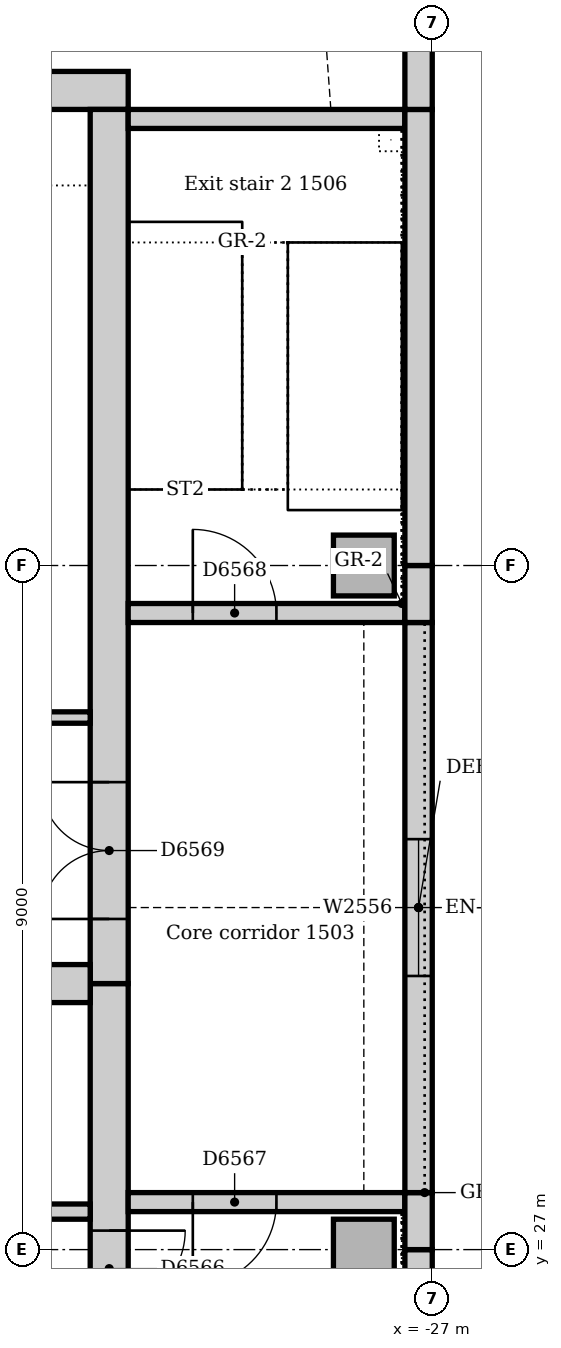
"""IFC4 building model, lengths in metres.
Left out: names, types, materials, properties, quantities, classifications, styles, units other than length and angle.
Written with IfcOpenShell. Run it as: python <this file> out.ifc"""

import sys

from ifc_helpers import new_model, si_unit, direction, frame, frame_2d, origin, origin_2d, place, context, subcontext, project, spatial, rectangle, extrude, element, fill, save


model = new_model("IFC4")
c1 = context("Model", 3, precision=1e-05, world=origin(), true_north=direction((0.0, 1.0)))
c2 = subcontext(c1, "Body", "Model", "MODEL_VIEW")
j1 = project(units=[si_unit("LENGTHUNIT", "METRE"), si_unit("PLANEANGLEUNIT", "RADIAN")], contexts=[c1])
p1 = place(None, origin())
s1 = spatial("IfcSite", under=j1, at=p1, CompositionType="ELEMENT")
p2 = place(p1, origin())
s2 = spatial("IfcBuilding", under=s1, at=p2, CompositionType="ELEMENT")
p3 = place(p2, frame((0.0, 0.0, 67.0)))
s3 = spatial("IfcBuildingStorey", under=s2, at=p3, CompositionType="ELEMENT", Elevation=67.0)
p4 = place(p3, frame((-31.0, 42.25, 0.0), z_axis=(0.0, 0.0, 1.0), x_axis=(-1.0, 0.0, 0.0)))
e1 = element("IfcWall", 1, at=p4, inside=s3, PredefinedType="SOLIDWALL", context=c2, shape_type="SweptSolid", body=[
    extrude(rectangle(XDim=11.5, YDim=0.5, at=frame_2d((5.75, 0.0))), origin(), (0.0, 0.0, 1.0), 4.0),
])
p5 = place(p3, frame((-31.25, 21.0, 0.0), z_axis=(0.0, 0.0, 1.0), x_axis=(0.0, 1.0, 0.0)))
e2 = element("IfcWall", 2, at=p5, inside=s3, PredefinedType="SOLIDWALL", context=c2, shape_type="SweptSolid", body=[
    extrude(rectangle(XDim=9.5, YDim=0.5, at=frame_2d((4.75, 0.0))), origin(), (0.0, 0.0, 1.0), 4.0),
])
p6 = place(p5, frame((5.25, 0.0, 0.0)))
e3 = element("IfcOpeningElement", 3, at=p6, cuts=e2, PredefinedType="OPENING", context=c2, shape_type="SweptSolid", body=[
    extrude(rectangle(XDim=1.0, YDim=2.1, at=frame_2d((0.5, 1.05))), frame((0.0, 0.26, 0.0), z_axis=(0.0, -1.0, 0.0), x_axis=(1.0, 0.0, 0.0)), (0.0, 0.0, 1.0), 0.52),
])
p7 = place(p3, frame((-31.25, 30.5, 0.0), z_axis=(0.0, 0.0, 1.0), x_axis=(0.0, 1.0, 0.0)))
e4 = element("IfcWall", 4, at=p7, inside=s3, PredefinedType="SOLIDWALL", context=c2, shape_type="SweptSolid", body=[
    extrude(rectangle(XDim=11.5, YDim=0.5, at=frame_2d((5.75, 0.0))), origin(), (0.0, 0.0, 1.0), 4.0),
])
p8 = place(p7, frame((0.85, 0.0, 0.0)))
e5 = element("IfcOpeningElement", 5, at=p8, cuts=e4, PredefinedType="OPENING", context=c2, shape_type="SweptSolid", body=[
    extrude(rectangle(XDim=1.8, YDim=2.1, at=frame_2d((0.9, 1.05))), frame((0.0, 0.26, 0.0), z_axis=(0.0, -1.0, 0.0), x_axis=(1.0, 0.0, 0.0)), (0.0, 0.0, 1.0), 0.52),
])
p9 = place(p3, frame((-42.0, 30.5, 0.0), z_axis=(0.0, 0.0, 1.0), x_axis=(1.0, 0.0, 0.0)))
e6 = element("IfcWall", 6, at=p9, inside=s3, PredefinedType="SOLIDWALL", context=c2, shape_type="SweptSolid", body=[
    extrude(rectangle(XDim=10.5, YDim=0.5, at=frame_2d((5.25, 0.0))), origin(), (0.0, 0.0, 1.0), 4.0),
])
p10 = place(p3, frame((-27.36, 27.625, 0.0), z_axis=(0.0, 0.0, 1.0), x_axis=(-1.0, 0.0, 0.0)))
e7 = element("IfcWall", 7, at=p10, inside=s3, PredefinedType="SOLIDWALL", context=c2, shape_type="SweptSolid", body=[
    extrude(rectangle(XDim=3.64, YDim=0.25, at=frame_2d((1.82, 0.0))), origin(), (0.0, 0.0, 1.0), 4.0),
])
p11 = place(p10, frame((1.69, 0.0, 0.0)))
e8 = element("IfcOpeningElement", 8, at=p11, cuts=e7, PredefinedType="OPENING", context=c2, shape_type="SweptSolid", body=[
    extrude(rectangle(XDim=1.1, YDim=2.1, at=frame_2d((0.55, 1.05))), frame((0.0, 0.135, 0.0), z_axis=(0.0, -1.0, 0.0), x_axis=(1.0, 0.0, 0.0)), (0.0, 0.0, 1.0), 0.27),
])
p12 = place(p3, frame((-31.0, 35.375, 0.0), z_axis=(0.0, 0.0, 1.0), x_axis=(1.0, 0.0, 0.0)))
e9 = element("IfcWall", 9, at=p12, inside=s3, PredefinedType="SOLIDWALL", context=c2, shape_type="SweptSolid", body=[
    extrude(rectangle(XDim=3.64, YDim=0.25, at=frame_2d((1.82, 0.0))), origin(), (0.0, 0.0, 1.0), 4.0),
])
p13 = place(p12, frame((0.85, 0.0, 0.0)))
e10 = element("IfcOpeningElement", 10, at=p13, cuts=e9, PredefinedType="OPENING", context=c2, shape_type="SweptSolid", body=[
    extrude(rectangle(XDim=1.1, YDim=2.1, at=frame_2d((0.55, 1.05))), frame((0.0, 0.135, 0.0), z_axis=(0.0, -1.0, 0.0), x_axis=(1.0, 0.0, 0.0)), (0.0, 0.0, 1.0), 0.27),
])
p14 = place(p3, frame((-27.36, 41.875, 0.0), z_axis=(0.0, 0.0, 1.0), x_axis=(-1.0, 0.0, 0.0)))
e11 = element("IfcWall", 11, at=p14, inside=s3, PredefinedType="SOLIDWALL", context=c2, shape_type="SweptSolid", body=[
    extrude(rectangle(XDim=3.64, YDim=0.25, at=frame_2d((1.82, 0.0))), origin(), (0.0, 0.0, 1.0), 4.0),
])
for number, where, z_axis, x_axis in (
    (12, (-27.9, 27.0, 0.0), (0.0, 0.0, 1.0), (1.0, 0.0, 0.0)),
    (13, (-27.9, 36.0, 0.0), (0.0, 0.0, 1.0), (1.0, 0.0, 0.0)),
):
    element("IfcColumn", number, at=place(p3, frame(where, z_axis=z_axis, x_axis=x_axis)), inside=s3, PredefinedType="COLUMN", context=c2, shape_type="SweptSolid", body=[
        extrude(rectangle(XDim=0.8, YDim=0.8, at=origin_2d()), origin(), (0.0, 0.0, 1.0), 4.0),
    ])
p15 = place(p3, frame((-27.18, 21.0, 0.0), z_axis=(0.0, 0.0, 1.0), x_axis=(0.0, 1.0, 0.0)))
e14 = element("IfcWall", 14, at=p15, inside=s3, PredefinedType="STANDARD", context=c2, shape_type="SweptSolid", body=[
    extrude(rectangle(XDim=6.0, YDim=0.36, at=frame_2d((3.0, 0.0))), origin(), (0.0, 0.0, 1.0), 3.85),
])
p16 = place(p3, frame((-27.18, 27.0, 0.0), z_axis=(0.0, 0.0, 1.0), x_axis=(0.0, 1.0, 0.0)))
e15 = element("IfcWall", 15, at=p16, inside=s3, PredefinedType="STANDARD", context=c2, shape_type="SweptSolid", body=[
    extrude(rectangle(XDim=0.75, YDim=0.36, at=frame_2d((0.375, 0.0))), origin(), (0.0, 0.0, 1.0), 3.436),
])
p17 = place(p3, frame((-27.18, 27.75, 0.0), z_axis=(0.0, 0.0, 1.0), x_axis=(0.0, 1.0, 0.0)))
e16 = element("IfcWall", 16, at=p17, inside=s3, PredefinedType="STANDARD", context=c2, shape_type="SweptSolid", body=[
    extrude(rectangle(XDim=7.5, YDim=0.36, at=frame_2d((3.75, 0.0))), origin(), (0.0, 0.0, 1.0), 3.436),
])
p18 = place(p17, frame((2.85, 0.0, 1.2)))
e17 = element("IfcOpeningElement", 17, at=p18, cuts=e16, PredefinedType="OPENING", context=c2, shape_type="SweptSolid", body=[
    extrude(rectangle(XDim=1.8, YDim=1.2, at=frame_2d((0.9, 0.6))), frame((0.0, 0.19, 0.0), z_axis=(0.0, -1.0, 0.0), x_axis=(1.0, 0.0, 0.0)), (0.0, 0.0, 1.0), 0.38),
])
p19 = place(p3, frame((-27.18, 35.25, 0.0), z_axis=(0.0, 0.0, 1.0), x_axis=(0.0, 1.0, 0.0)))
e18 = element("IfcWall", 18, at=p19, inside=s3, PredefinedType="STANDARD", context=c2, shape_type="SweptSolid", body=[
    extrude(rectangle(XDim=0.75, YDim=0.36, at=frame_2d((0.375, 0.0))), origin(), (0.0, 0.0, 1.0), 3.436),
])
p20 = place(p3, frame((-27.18, 36.0, 0.0), z_axis=(0.0, 0.0, 1.0), x_axis=(0.0, 1.0, 0.0)))
e19 = element("IfcWall", 19, at=p20, inside=s3, PredefinedType="STANDARD", context=c2, shape_type="SweptSolid", body=[
    extrude(rectangle(XDim=6.0, YDim=0.36, at=frame_2d((3.0, 0.0))), origin(), (0.0, 0.0, 1.0), 3.85),
])
p21 = place(p3, frame((-27.18, 42.0, 0.0), z_axis=(0.0, 0.0, 1.0), x_axis=(0.0, 1.0, 0.0)))
e20 = element("IfcWall", 20, at=p21, inside=s3, PredefinedType="STANDARD", context=c2, shape_type="SweptSolid", body=[
    extrude(rectangle(XDim=1.007, YDim=0.36, at=frame_2d((0.504, 0.0))), origin(), (0.0, 0.0, 1.0), 3.85),
])
p22 = place(p3, frame((-34.9, 27.5, 0.0), z_axis=(0.0, 0.0, 1.0), x_axis=(1.0, 0.0, 0.0)))
e21 = element("IfcWall", 21, at=p22, inside=s3, PredefinedType="SOLIDWALL", context=c2, shape_type="SweptSolid", body=[
    extrude(rectangle(XDim=3.4, YDim=0.2, at=frame_2d((1.7, 0.0))), origin(), (0.0, 0.0, 1.0), 4.0),
])
p23 = place(p22, frame((1.1, 0.0, 0.0)))
e22 = element("IfcOpeningElement", 22, at=p23, cuts=e21, PredefinedType="OPENING", context=c2, shape_type="SweptSolid", body=[
    extrude(rectangle(XDim=1.1, YDim=2.1, at=frame_2d((0.55, 1.05))), frame((0.0, 0.11, 0.0), z_axis=(0.0, -1.0, 0.0), x_axis=(1.0, 0.0, 0.0)), (0.0, 0.0, 1.0), 0.22),
])
p24 = place(p3, frame((-34.075, 34.0, 0.0), z_axis=(0.0, 0.0, 1.0), x_axis=(1.0, 0.0, 0.0)))
e23 = element("IfcWall", 23, at=p24, inside=s3, PredefinedType="SOLIDWALL", context=c2, shape_type="SweptSolid", body=[
    extrude(rectangle(XDim=2.575, YDim=0.15, at=frame_2d((1.288, 0.0))), origin(), (0.0, 0.0, 1.0), 4.0),
])
p25 = place(p18, origin())
e24 = element("IfcWindow", 24, at=p25, inside=s3, PartitioningType="SINGLE_PANEL", PredefinedType="WINDOW", context=c2, shape_type="SweptSolid", body=[
    extrude(rectangle(XDim=1.8, YDim=1.2, at=frame_2d((0.9, 0.6))), frame((0.0, 0.13, 0.0), z_axis=(0.0, -1.0, 0.0), x_axis=(1.0, 0.0, 0.0)), (0.0, 0.0, 1.0), 0.06),
])
fill(e17, e24)
p26 = place(p6, frame((1.0, 0.0, 0.0), z_axis=(0.0, 0.0, 1.0), x_axis=(-1.0, 0.0, 0.0)))
e25 = element("IfcDoor", 25, at=p26, inside=s3, OperationType="SINGLE_SWING_LEFT", PredefinedType="DOOR", context=c2, shape_type="SweptSolid", body=[
    extrude(rectangle(XDim=1.0, YDim=2.1, at=frame_2d((0.5, 1.05))), frame((0.0, 0.025, 0.0), z_axis=(0.0, -1.0, 0.0), x_axis=(1.0, 0.0, 0.0)), (0.0, 0.0, 1.0), 0.05),
])
fill(e3, e25)
p27 = place(p11, origin())
e26 = element("IfcDoor", 26, at=p27, inside=s3, OperationType="SINGLE_SWING_RIGHT", PredefinedType="DOOR", context=c2, shape_type="SweptSolid", body=[
    extrude(rectangle(XDim=1.1, YDim=2.1, at=frame_2d((0.55, 1.05))), frame((0.0, 0.025, 0.0), z_axis=(0.0, -1.0, 0.0), x_axis=(1.0, 0.0, 0.0)), (0.0, 0.0, 1.0), 0.05),
])
fill(e8, e26)
p28 = place(p13, origin())
e27 = element("IfcDoor", 27, at=p28, inside=s3, OperationType="SINGLE_SWING_LEFT", PredefinedType="DOOR", context=c2, shape_type="SweptSolid", body=[
    extrude(rectangle(XDim=1.1, YDim=2.1, at=frame_2d((0.55, 1.05))), frame((0.0, 0.025, 0.0), z_axis=(0.0, -1.0, 0.0), x_axis=(1.0, 0.0, 0.0)), (0.0, 0.0, 1.0), 0.05),
])
fill(e10, e27)
p29 = place(p8, origin())
e28 = element("IfcDoor", 28, at=p29, inside=s3, OperationType="DOUBLE_DOOR_SINGLE_SWING", PredefinedType="DOOR", context=c2, shape_type="SweptSolid", body=[
    extrude(rectangle(XDim=1.8, YDim=2.1, at=frame_2d((0.9, 1.05))), frame((0.0, 0.025, 0.0), z_axis=(0.0, -1.0, 0.0), x_axis=(1.0, 0.0, 0.0)), (0.0, 0.0, 1.0), 0.05),
])
fill(e5, e28)
save(model, sys.argv[1])
